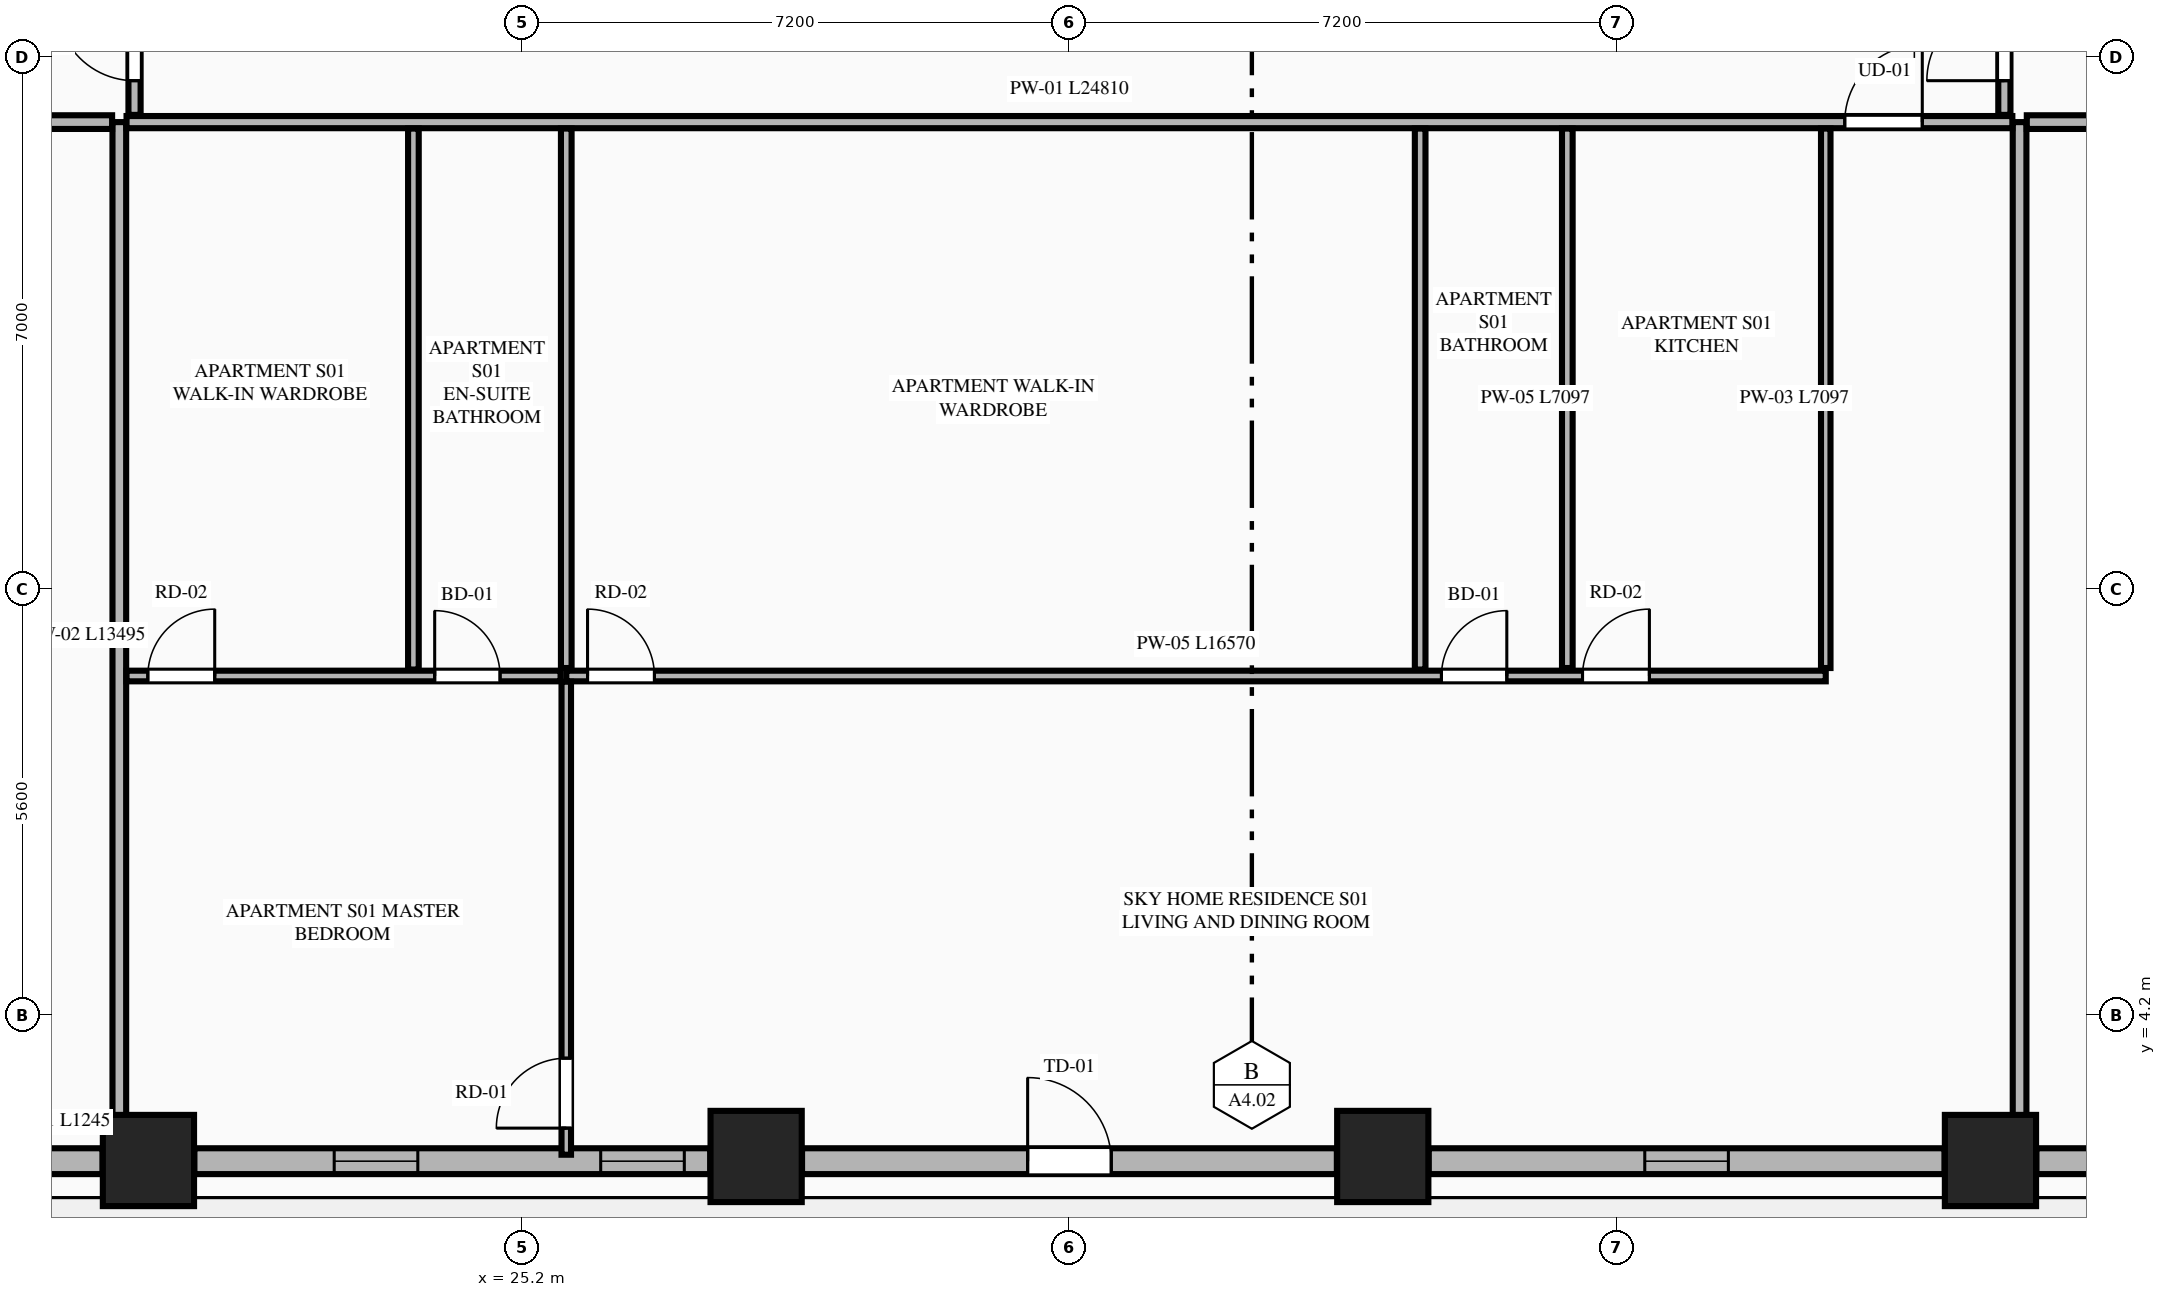
"""IFC4 building model, lengths in metres.
Left out: names, types, materials, properties, quantities, classifications, styles, units other than length and angle.
Written with IfcOpenShell. Run it as: python <this file> out.ifc"""

import sys

from ifc_helpers import new_model, si_unit, direction, frame, frame_2d, origin, origin_2d, place, context, subcontext, project, spatial, rectangle, extrude, element, fill, save


model = new_model("IFC4")
c1 = context("Model", 3, precision=1e-05, world=origin(), true_north=direction((0.0, 1.0)))
c2 = subcontext(c1, "Body", "Model", "MODEL_VIEW")
j1 = project(units=[si_unit("LENGTHUNIT", "METRE"), si_unit("PLANEANGLEUNIT", "RADIAN")], contexts=[c1])
p1 = place(None, origin())
s1 = spatial("IfcSite", under=j1, at=p1, CompositionType="ELEMENT")
p2 = place(p1, origin())
s2 = spatial("IfcBuilding", under=s1, at=p2, CompositionType="ELEMENT")
p3 = place(p2, frame((0.0, 0.0, 49.75)))
s3 = spatial("IfcBuildingStorey", under=s2, at=p3, CompositionType="ELEMENT", Elevation=49.75)
for number, where, z_axis, x_axis in (
    (1, (20.283, 2.289, 0.0), (0.0, 0.0, 1.0), (1.0, 0.0, 0.0)),
    (2, (28.278, 2.342, 0.0), (0.0, 0.0, 1.0), (1.0, 0.0, 0.0)),
    (3, (36.522, 2.342, 0.0), (0.0, 0.0, 1.0), (1.0, 0.0, 0.0)),
    (4, (44.517, 2.289, 0.0), (0.0, 0.0, 1.0), (1.0, 0.0, 0.0)),
):
    element("IfcColumn", number, at=place(p3, frame(where, z_axis=z_axis, x_axis=x_axis)), inside=s3, PredefinedType="COLUMN", context=c2, shape_type="SweptSolid", body=[
        extrude(rectangle(XDim=1.2, YDim=1.2, at=origin_2d()), origin(), (0.0, 0.0, 1.0), 3.55),
    ])
p4 = place(p3, frame((18.434, 2.28, 0.0), z_axis=(0.0, 0.0, 1.0), x_axis=(1.0, 0.0, 0.0)))
e5 = element("IfcWall", 5, at=p4, inside=s3, PredefinedType="STANDARD", context=c2, shape_type="SweptSolid", body=[
    extrude(rectangle(XDim=1.245, YDim=0.34, at=frame_2d((0.623, 0.0))), origin(), (0.0, 0.0, 1.0), 3.33),
])
p5 = place(p3, frame((20.887, 2.28, 0.0), z_axis=(0.0, 0.0, 1.0), x_axis=(1.0, 0.0, 0.0)))
e6 = element("IfcWall", 6, at=p5, inside=s3, PredefinedType="STANDARD", context=c2, shape_type="SweptSolid", body=[
    extrude(rectangle(XDim=6.787, YDim=0.34, at=frame_2d((3.394, 0.0))), origin(), (0.0, 0.0, 1.0), 2.787),
])
p6 = place(p5, frame((1.84, 0.0, 0.75)))
e7 = element("IfcOpeningElement", 7, at=p6, cuts=e6, PredefinedType="OPENING", context=c2, shape_type="SweptSolid", body=[
    extrude(rectangle(XDim=1.1, YDim=1.887, at=frame_2d((0.55, 0.943))), frame((0.0, 0.18, 0.0), z_axis=(0.0, -1.0, 0.0), x_axis=(1.0, 0.0, 0.0)), (0.0, 0.0, 1.0), 0.36),
])
p7 = place(p5, frame((5.346, 0.0, 0.75)))
e8 = element("IfcOpeningElement", 8, at=p7, cuts=e6, PredefinedType="OPENING", context=c2, shape_type="SweptSolid", body=[
    extrude(rectangle(XDim=1.1, YDim=1.887, at=frame_2d((0.55, 0.943))), frame((0.0, 0.18, 0.0), z_axis=(0.0, -1.0, 0.0), x_axis=(1.0, 0.0, 0.0)), (0.0, 0.0, 1.0), 0.36),
])
p8 = place(p3, frame((28.882, 2.28, 0.0), z_axis=(0.0, 0.0, 1.0), x_axis=(1.0, 0.0, 0.0)))
e9 = element("IfcWall", 9, at=p8, inside=s3, PredefinedType="STANDARD", context=c2, shape_type="SweptSolid", body=[
    extrude(rectangle(XDim=7.036, YDim=0.34, at=frame_2d((3.518, 0.0))), origin(), (0.0, 0.0, 1.0), 2.787),
])
p9 = place(p8, frame((2.968, 0.0, 0.0)))
e10 = element("IfcOpeningElement", 10, at=p9, cuts=e9, PredefinedType="OPENING", context=c2, shape_type="SweptSolid", body=[
    extrude(rectangle(XDim=1.1, YDim=2.25, at=frame_2d((0.55, 1.125))), frame((0.0, 0.18, 0.0), z_axis=(0.0, -1.0, 0.0), x_axis=(1.0, 0.0, 0.0)), (0.0, 0.0, 1.0), 0.36),
])
p10 = place(p3, frame((37.126, 2.28, 0.0), z_axis=(0.0, 0.0, 1.0), x_axis=(1.0, 0.0, 0.0)))
e11 = element("IfcWall", 11, at=p10, inside=s3, PredefinedType="STANDARD", context=c2, shape_type="SweptSolid", body=[
    extrude(rectangle(XDim=6.787, YDim=0.34, at=frame_2d((3.394, 0.0))), origin(), (0.0, 0.0, 1.0), 2.787),
])
p11 = place(p10, frame((2.843, 0.0, 0.75)))
e12 = element("IfcOpeningElement", 12, at=p11, cuts=e11, PredefinedType="OPENING", context=c2, shape_type="SweptSolid", body=[
    extrude(rectangle(XDim=1.1, YDim=1.887, at=frame_2d((0.55, 0.943))), frame((0.0, 0.18, 0.0), z_axis=(0.0, -1.0, 0.0), x_axis=(1.0, 0.0, 0.0)), (0.0, 0.0, 1.0), 0.36),
])
p12 = place(p3, frame((45.121, 2.28, 0.0), z_axis=(0.0, 0.0, 1.0), x_axis=(1.0, 0.0, 0.0)))
e13 = element("IfcWall", 13, at=p12, inside=s3, PredefinedType="STANDARD", context=c2, shape_type="SweptSolid", body=[
    extrude(rectangle(XDim=1.245, YDim=0.34, at=frame_2d((0.623, 0.0))), origin(), (0.0, 0.0, 1.0), 3.33),
])
for number, where, z_axis, x_axis in (
    (14, (19.9, 2.455, 0.0), (0.0, 0.0, 1.0), (0.0, 1.0, 0.0)),
    (15, (44.9, 2.455, 0.0), (0.0, 0.0, 1.0), (0.0, 1.0, 0.0)),
):
    element("IfcWall", number, at=place(p3, frame(where, z_axis=z_axis, x_axis=x_axis)), inside=s3, PredefinedType="PARTITIONING", context=c2, shape_type="SweptSolid", body=[
        extrude(rectangle(XDim=13.495, YDim=0.18, at=frame_2d((6.748, 0.0))), origin(), (0.0, 0.0, 1.0), 3.33),
    ])
p13 = place(p3, frame((19.995, 15.95, 0.0), z_axis=(0.0, 0.0, 1.0), x_axis=(1.0, 0.0, 0.0)))
e16 = element("IfcWall", 16, at=p13, inside=s3, PredefinedType="PARTITIONING", context=c2, shape_type="SweptSolid", body=[
    extrude(rectangle(XDim=24.81, YDim=0.16, at=frame_2d((12.405, 0.0))), origin(), (0.0, 0.0, 1.0), 3.33),
])
p14 = place(p13, frame((22.605, 0.0, 0.0)))
e17 = element("IfcOpeningElement", 17, at=p14, cuts=e16, PredefinedType="OPENING", context=c2, shape_type="SweptSolid", body=[
    extrude(rectangle(XDim=1.02, YDim=2.25, at=frame_2d((0.51, 1.125))), frame((0.0, 0.09, 0.0), z_axis=(0.0, -1.0, 0.0), x_axis=(1.0, 0.0, 0.0)), (0.0, 0.0, 1.0), 0.18),
])
p15 = place(p3, frame((42.35, 8.768, 0.0), z_axis=(0.0, 0.0, 1.0), x_axis=(0.0, 1.0, 0.0)))
e18 = element("IfcWall", 18, at=p15, inside=s3, PredefinedType="PARTITIONING", context=c2, shape_type="SweptSolid", body=[
    extrude(rectangle(XDim=7.097, YDim=0.125, at=frame_2d((3.548, 0.0))), origin(), (0.0, 0.0, 1.0), 2.7),
])
p16 = place(p3, frame((25.78, 8.663, 0.0), z_axis=(0.0, 0.0, 1.0), x_axis=(1.0, 0.0, 0.0)))
e19 = element("IfcWall", 19, at=p16, inside=s3, PredefinedType="PLUMBINGWALL", context=c2, shape_type="SweptSolid", body=[
    extrude(rectangle(XDim=16.57, YDim=0.14, at=frame_2d((8.285, 0.0))), origin(), (0.0, 0.0, 1.0), 3.33),
])
p17 = place(p16, frame((0.28, 0.0, 0.0)))
e20 = element("IfcOpeningElement", 20, at=p17, cuts=e19, PredefinedType="OPENING", context=c2, shape_type="SweptSolid", body=[
    extrude(rectangle(XDim=0.88, YDim=2.15, at=frame_2d((0.44, 1.075))), frame((0.0, 0.08, 0.0), z_axis=(0.0, -1.0, 0.0), x_axis=(1.0, 0.0, 0.0)), (0.0, 0.0, 1.0), 0.16),
])
p18 = place(p16, frame((11.514, 0.0, 0.0)))
e21 = element("IfcOpeningElement", 21, at=p18, cuts=e19, PredefinedType="OPENING", context=c2, shape_type="SweptSolid", body=[
    extrude(rectangle(XDim=0.86, YDim=2.1, at=frame_2d((0.43, 1.05))), frame((0.0, 0.08, 0.0), z_axis=(0.0, -1.0, 0.0), x_axis=(1.0, 0.0, 0.0)), (0.0, 0.0, 1.0), 0.16),
])
p19 = place(p16, frame((13.37, 0.0, 0.0)))
e22 = element("IfcOpeningElement", 22, at=p19, cuts=e19, PredefinedType="OPENING", context=c2, shape_type="SweptSolid", body=[
    extrude(rectangle(XDim=0.88, YDim=2.15, at=frame_2d((0.44, 1.075))), frame((0.0, 0.08, 0.0), z_axis=(0.0, -1.0, 0.0), x_axis=(1.0, 0.0, 0.0)), (0.0, 0.0, 1.0), 0.16),
])
p20 = place(p3, frame((19.995, 8.663, 0.0), z_axis=(0.0, 0.0, 1.0), x_axis=(1.0, 0.0, 0.0)))
e23 = element("IfcWall", 23, at=p20, inside=s3, PredefinedType="PLUMBINGWALL", context=c2, shape_type="SweptSolid", body=[
    extrude(rectangle(XDim=5.71, YDim=0.14, at=frame_2d((2.855, 0.0))), origin(), (0.0, 0.0, 1.0), 3.33),
])
p21 = place(p20, frame((0.28, 0.0, 0.0)))
e24 = element("IfcOpeningElement", 24, at=p21, cuts=e23, PredefinedType="OPENING", context=c2, shape_type="SweptSolid", body=[
    extrude(rectangle(XDim=0.88, YDim=2.15, at=frame_2d((0.44, 1.075))), frame((0.0, 0.08, 0.0), z_axis=(0.0, -1.0, 0.0), x_axis=(1.0, 0.0, 0.0)), (0.0, 0.0, 1.0), 0.16),
])
p22 = place(p20, frame((4.054, 0.0, 0.0)))
e25 = element("IfcOpeningElement", 25, at=p22, cuts=e23, PredefinedType="OPENING", context=c2, shape_type="SweptSolid", body=[
    extrude(rectangle(XDim=0.86, YDim=2.1, at=frame_2d((0.43, 1.05))), frame((0.0, 0.08, 0.0), z_axis=(0.0, -1.0, 0.0), x_axis=(1.0, 0.0, 0.0)), (0.0, 0.0, 1.0), 0.16),
])
for number, where, z_axis, x_axis in (
    (26, (38.95, 8.768, 0.0), (0.0, 0.0, 1.0), (0.0, 1.0, 0.0)),
    (27, (25.78, 8.768, 0.0), (0.0, 0.0, 1.0), (0.0, 1.0, 0.0)),
):
    element("IfcWall", number, at=place(p3, frame(where, z_axis=z_axis, x_axis=x_axis)), inside=s3, PredefinedType="PLUMBINGWALL", context=c2, shape_type="SweptSolid", body=[
        extrude(rectangle(XDim=7.097, YDim=0.14, at=frame_2d((3.548, 0.0))), origin(), (0.0, 0.0, 1.0), 3.33),
    ])
p23 = place(p3, frame((25.78, 2.365, 0.0), z_axis=(0.0, 0.0, 1.0), x_axis=(0.0, 1.0, 0.0)))
e28 = element("IfcWall", 28, at=p23, inside=s3, PredefinedType="PARTITIONING", context=c2, shape_type="SweptSolid", body=[
    extrude(rectangle(XDim=6.223, YDim=0.125, at=frame_2d((3.111, 0.0))), origin(), (0.0, 0.0, 1.0), 3.33),
])
p24 = place(p23, frame((0.35, 0.0, 0.0)))
e29 = element("IfcOpeningElement", 29, at=p24, cuts=e28, PredefinedType="OPENING", context=c2, shape_type="SweptSolid", body=[
    extrude(rectangle(XDim=0.92, YDim=2.15, at=frame_2d((0.46, 1.075))), frame((0.0, 0.073, 0.0), z_axis=(0.0, -1.0, 0.0), x_axis=(1.0, 0.0, 0.0)), (0.0, 0.0, 1.0), 0.145),
])
for number, where, z_axis, x_axis in (
    (30, (37.014, 8.748, 0.0), (0.0, 0.0, 1.0), (0.0, 1.0, 0.0)),
    (31, (23.769, 8.748, 0.0), (0.0, 0.0, 1.0), (0.0, 1.0, 0.0)),
):
    element("IfcWall", number, at=place(p3, frame(where, z_axis=z_axis, x_axis=x_axis)), inside=s3, PredefinedType="PLUMBINGWALL", context=c2, shape_type="SweptSolid", body=[
        extrude(rectangle(XDim=7.117, YDim=0.14, at=frame_2d((3.559, 0.0))), origin(), (0.0, 0.0, 1.0), 3.33),
    ])
for number, where, z_axis, x_axis in (
    (32, (10.564, 15.95, 0.0), (0.0, 0.0, 1.0), (1.0, 0.0, 0.0)),
    (33, (44.995, 15.95, 0.0), (0.0, 0.0, 1.0), (1.0, 0.0, 0.0)),
):
    element("IfcWall", number, at=place(p3, frame(where, z_axis=z_axis, x_axis=x_axis)), inside=s3, PredefinedType="PARTITIONING", context=c2, shape_type="SweptSolid", body=[
        extrude(rectangle(XDim=9.241, YDim=0.18, at=frame_2d((4.621, 0.0))), origin(), (0.0, 0.0, 1.0), 3.33),
    ])
p25 = place(p3, frame((20.1, 16.045, 0.0), z_axis=(0.0, 0.0, 1.0), x_axis=(0.0, 1.0, 0.0)))
e34 = element("IfcWall", 34, at=p25, inside=s3, PredefinedType="PARTITIONING", context=c2, shape_type="SweptSolid", body=[
    extrude(rectangle(XDim=19.71, YDim=0.16, at=frame_2d((9.855, 0.0))), origin(), (0.0, 0.0, 1.0), 2.7),
])
p26 = place(p25, frame((0.45, 0.0, 0.0)))
e35 = element("IfcOpeningElement", 35, at=p26, cuts=e34, PredefinedType="OPENING", context=c2, shape_type="SweptSolid", body=[
    extrude(rectangle(XDim=1.02, YDim=2.25, at=frame_2d((0.51, 1.125))), frame((0.0, 0.09, 0.0), z_axis=(0.0, -1.0, 0.0), x_axis=(1.0, 0.0, 0.0)), (0.0, 0.0, 1.0), 0.18),
])
p27 = place(p3, frame((44.7, 16.045, 0.0), z_axis=(0.0, 0.0, 1.0), x_axis=(0.0, 1.0, 0.0)))
e36 = element("IfcWall", 36, at=p27, inside=s3, PredefinedType="PARTITIONING", context=c2, shape_type="SweptSolid", body=[
    extrude(rectangle(XDim=19.71, YDim=0.16, at=frame_2d((9.855, 0.0))), origin(), (0.0, 0.0, 1.0), 2.7),
])
p28 = place(p27, frame((0.45, 0.0, 0.0)))
e37 = element("IfcOpeningElement", 37, at=p28, cuts=e36, PredefinedType="OPENING", context=c2, shape_type="SweptSolid", body=[
    extrude(rectangle(XDim=1.02, YDim=2.25, at=frame_2d((0.51, 1.125))), frame((0.0, 0.09, 0.0), z_axis=(0.0, -1.0, 0.0), x_axis=(1.0, 0.0, 0.0)), (0.0, 0.0, 1.0), 0.18),
])
p29 = place(p6, origin())
e38 = element("IfcWindow", 38, at=p29, inside=s3, PartitioningType="SINGLE_PANEL", PredefinedType="WINDOW", context=c2, shape_type="SweptSolid", body=[
    extrude(rectangle(XDim=1.1, YDim=1.887, at=frame_2d((0.55, 0.943))), frame((0.0, 0.03, 0.0), z_axis=(0.0, -1.0, 0.0), x_axis=(1.0, 0.0, 0.0)), (0.0, 0.0, 1.0), 0.06),
])
fill(e7, e38)
p30 = place(p9, origin())
e39 = element("IfcDoor", 39, at=p30, inside=s3, OperationType="SINGLE_SWING_LEFT", PredefinedType="DOOR", context=c2, shape_type="SweptSolid", body=[
    extrude(rectangle(XDim=1.1, YDim=2.25, at=frame_2d((0.55, 1.125))), frame((0.0, 0.025, 0.0), z_axis=(0.0, -1.0, 0.0), x_axis=(1.0, 0.0, 0.0)), (0.0, 0.0, 1.0), 0.05),
])
fill(e10, e39)
p31 = place(p11, origin())
e40 = element("IfcWindow", 40, at=p31, inside=s3, PartitioningType="SINGLE_PANEL", PredefinedType="WINDOW", context=c2, shape_type="SweptSolid", body=[
    extrude(rectangle(XDim=1.1, YDim=1.887, at=frame_2d((0.55, 0.943))), frame((0.0, 0.03, 0.0), z_axis=(0.0, -1.0, 0.0), x_axis=(1.0, 0.0, 0.0)), (0.0, 0.0, 1.0), 0.06),
])
fill(e12, e40)
p32 = place(p17, origin())
e41 = element("IfcDoor", 41, at=p32, inside=s3, OperationType="SINGLE_SWING_LEFT", PredefinedType="DOOR", context=c2, shape_type="SweptSolid", body=[
    extrude(rectangle(XDim=0.88, YDim=2.15, at=frame_2d((0.44, 1.075))), frame((0.0, 0.025, 0.0), z_axis=(0.0, -1.0, 0.0), x_axis=(1.0, 0.0, 0.0)), (0.0, 0.0, 1.0), 0.05),
])
fill(e20, e41)
p33 = place(p18, origin())
e42 = element("IfcDoor", 42, at=p33, inside=s3, OperationType="SINGLE_SWING_RIGHT", PredefinedType="DOOR", context=c2, shape_type="SweptSolid", body=[
    extrude(rectangle(XDim=0.86, YDim=2.1, at=frame_2d((0.43, 1.05))), frame((0.0, 0.025, 0.0), z_axis=(0.0, -1.0, 0.0), x_axis=(1.0, 0.0, 0.0)), (0.0, 0.0, 1.0), 0.05),
])
fill(e21, e42)
p34 = place(p21, origin())
e43 = element("IfcDoor", 43, at=p34, inside=s3, OperationType="SINGLE_SWING_RIGHT", PredefinedType="DOOR", context=c2, shape_type="SweptSolid", body=[
    extrude(rectangle(XDim=0.88, YDim=2.15, at=frame_2d((0.44, 1.075))), frame((0.0, 0.025, 0.0), z_axis=(0.0, -1.0, 0.0), x_axis=(1.0, 0.0, 0.0)), (0.0, 0.0, 1.0), 0.05),
])
fill(e24, e43)
p35 = place(p22, origin())
e44 = element("IfcDoor", 44, at=p35, inside=s3, OperationType="SINGLE_SWING_LEFT", PredefinedType="DOOR", context=c2, shape_type="SweptSolid", body=[
    extrude(rectangle(XDim=0.86, YDim=2.1, at=frame_2d((0.43, 1.05))), frame((0.0, 0.025, 0.0), z_axis=(0.0, -1.0, 0.0), x_axis=(1.0, 0.0, 0.0)), (0.0, 0.0, 1.0), 0.05),
])
fill(e25, e44)
p36 = place(p14, origin())
e45 = element("IfcDoor", 45, at=p36, inside=s3, OperationType="SINGLE_SWING_RIGHT", PredefinedType="DOOR", context=c2, shape_type="SweptSolid", body=[
    extrude(rectangle(XDim=1.02, YDim=2.25, at=frame_2d((0.51, 1.125))), frame((0.0, 0.025, 0.0), z_axis=(0.0, -1.0, 0.0), x_axis=(1.0, 0.0, 0.0)), (0.0, 0.0, 1.0), 0.05),
])
fill(e17, e45)
p37 = place(p19, origin())
e46 = element("IfcDoor", 46, at=p37, inside=s3, OperationType="SINGLE_SWING_RIGHT", PredefinedType="DOOR", context=c2, shape_type="SweptSolid", body=[
    extrude(rectangle(XDim=0.88, YDim=2.15, at=frame_2d((0.44, 1.075))), frame((0.0, 0.025, 0.0), z_axis=(0.0, -1.0, 0.0), x_axis=(1.0, 0.0, 0.0)), (0.0, 0.0, 1.0), 0.05),
])
fill(e22, e46)
p38 = place(p24, origin())
e47 = element("IfcDoor", 47, at=p38, inside=s3, OperationType="SINGLE_SWING_LEFT", PredefinedType="DOOR", context=c2, shape_type="SweptSolid", body=[
    extrude(rectangle(XDim=0.92, YDim=2.15, at=frame_2d((0.46, 1.075))), frame((0.0, 0.025, 0.0), z_axis=(0.0, -1.0, 0.0), x_axis=(1.0, 0.0, 0.0)), (0.0, 0.0, 1.0), 0.05),
])
fill(e29, e47)
p39 = place(p26, origin())
e48 = element("IfcDoor", 48, at=p39, inside=s3, OperationType="SINGLE_SWING_RIGHT", PredefinedType="DOOR", context=c2, shape_type="SweptSolid", body=[
    extrude(rectangle(XDim=1.02, YDim=2.25, at=frame_2d((0.51, 1.125))), frame((0.0, 0.025, 0.0), z_axis=(0.0, -1.0, 0.0), x_axis=(1.0, 0.0, 0.0)), (0.0, 0.0, 1.0), 0.05),
])
fill(e35, e48)
p40 = place(p28, origin())
e49 = element("IfcDoor", 49, at=p40, inside=s3, OperationType="SINGLE_SWING_LEFT", PredefinedType="DOOR", context=c2, shape_type="SweptSolid", body=[
    extrude(rectangle(XDim=1.02, YDim=2.25, at=frame_2d((0.51, 1.125))), frame((0.0, 0.025, 0.0), z_axis=(0.0, -1.0, 0.0), x_axis=(1.0, 0.0, 0.0)), (0.0, 0.0, 1.0), 0.05),
])
fill(e37, e49)
p41 = place(p7, origin())
e50 = element("IfcWindow", 50, at=p41, inside=s3, PartitioningType="SINGLE_PANEL", PredefinedType="WINDOW", context=c2, shape_type="SweptSolid", body=[
    extrude(rectangle(XDim=1.1, YDim=1.887, at=frame_2d((0.55, 0.943))), frame((0.0, 0.03, 0.0), z_axis=(0.0, -1.0, 0.0), x_axis=(1.0, 0.0, 0.0)), (0.0, 0.0, 1.0), 0.06),
])
fill(e8, e50)
save(model, sys.argv[1])
